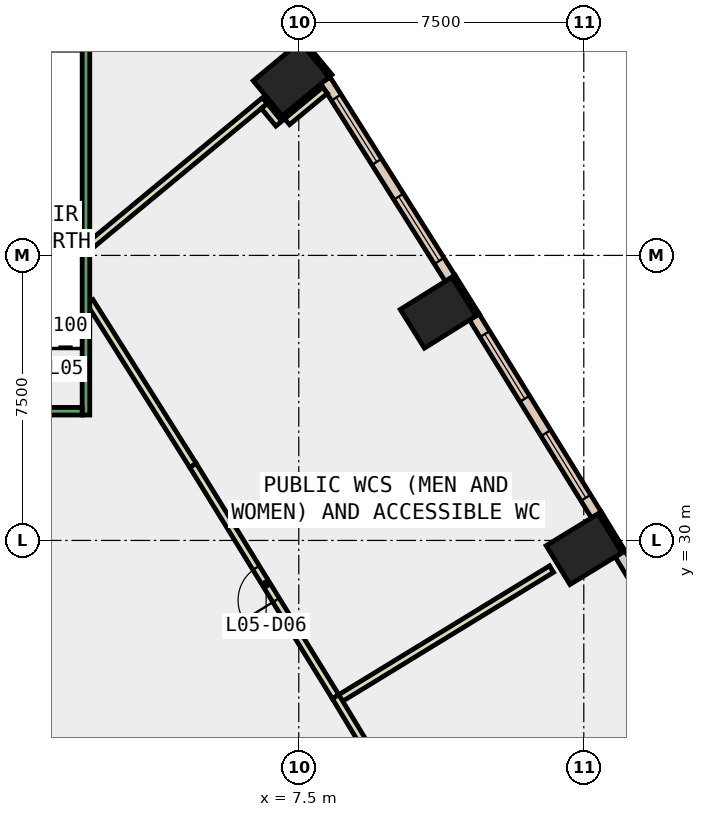
"""IFC4 building model, lengths in metres.
Left out: names, types, materials, properties, quantities, classifications, styles, units other than length and angle.
Written with IfcOpenShell. Run it as: python <this file> out.ifc"""

import sys

from ifc_helpers import new_model, si_unit, direction, frame, frame_2d, origin, origin_2d, place, context, subcontext, project, spatial, rectangle, extrude, element, fill, save


model = new_model("IFC4")
c1 = context("Model", 3, precision=1e-05, world=origin(), true_north=direction((0.0, 1.0)))
c2 = subcontext(c1, "Body", "Model", "MODEL_VIEW")
j1 = project(units=[si_unit("LENGTHUNIT", "METRE"), si_unit("PLANEANGLEUNIT", "RADIAN")], contexts=[c1])
p1 = place(None, origin())
s1 = spatial("IfcSite", under=j1, at=p1, CompositionType="ELEMENT")
p2 = place(p1, origin())
s2 = spatial("IfcBuilding", under=s1, at=p2, CompositionType="ELEMENT")
p3 = place(p2, frame((0.0, 0.0, 30.0)))
s3 = spatial("IfcBuildingStorey", under=s2, at=p3, CompositionType="ELEMENT", Elevation=30.0)
for number, where, z_axis, x_axis in (
    (1, (15.005, 29.769, -0.45), (0.0, 0.0, 1.0), (-0.522, 0.853, 0.0)),
    (2, (11.167, 35.993, -0.45), (0.0, 0.0, 1.0), (-0.53, 0.848, 0.0)),
    (3, (7.299, 42.144, -0.45), (0.0, 0.0, 1.0), (-0.638, 0.77, 0.0)),
):
    element("IfcColumn", number, at=place(p3, frame(where, z_axis=z_axis, x_axis=x_axis)), inside=s3, PredefinedType="COLUMN", context=c2, shape_type="SweptSolid", body=[
        extrude(rectangle(XDim=1.2, YDim=1.6, at=origin_2d()), origin(), (0.0, 0.0, 1.0), 4.85),
    ])
p4 = place(p3, frame((16.043, 29.7, 0.0), z_axis=(0.0, 0.0, 1.0), x_axis=(-0.521507599072, 0.853246637327, 0.0)))
e4 = element("IfcWall", 4, at=p4, inside=s3, PredefinedType="STANDARD", context=c2, shape_type="SweptSolid", body=[
    extrude(rectangle(XDim=1.2, YDim=0.1, at=frame_2d((0.6, 0.0))), origin(), (0.0, 0.0, 1.0), 4.4),
])
for number, where, z_axis, x_axis in (
    (5, (12.206, 35.935, 0.0), (0.0, 0.0, 1.0), (-0.53, 0.848, 0.0)),
    (6, (8.336, 42.224, 0.0), (0.0, 0.0, 1.0), (-0.638, 0.77, 0.0)),
):
    element("IfcWall", number, at=place(p3, frame(where, z_axis=z_axis, x_axis=x_axis)), inside=s3, PredefinedType="STANDARD", context=c2, shape_type="SweptSolid", body=[
        extrude(rectangle(XDim=1.199, YDim=0.1, at=frame_2d((0.6, 0.0))), origin(), (0.0, 0.0, 1.0), 4.4),
    ])
p5 = place(p3, frame((19.117, 24.406, 0.0), z_axis=(0.0, 0.0, 1.0), x_axis=(-0.516687651362, 0.85617397235, 0.0)))
e7 = element("IfcWall", 7, at=p5, inside=s3, PredefinedType="STANDARD", context=c2, shape_type="SweptSolid", body=[
    extrude(rectangle(XDim=6.121, YDim=0.3, at=frame_2d((3.061, 0.0))), origin(), (0.0, 0.0, 1.0), 4.4),
])
p6 = place(p5, frame((0.53, 0.0, 1.0)))
e8 = element("IfcOpeningElement", 8, at=p6, cuts=e7, PredefinedType="OPENING", context=c2, shape_type="SweptSolid", body=[
    extrude(rectangle(XDim=2.0, YDim=3.2, at=frame_2d((1.0, 1.6))), frame((0.0, 0.16, 0.0), z_axis=(0.0, -1.0, 0.0), x_axis=(1.0, 0.0, 0.0)), (0.0, 0.0, 1.0), 0.32),
])
p7 = place(p5, frame((3.591, 0.0, 1.0)))
e9 = element("IfcOpeningElement", 9, at=p7, cuts=e7, PredefinedType="OPENING", context=c2, shape_type="SweptSolid", body=[
    extrude(rectangle(XDim=2.0, YDim=3.2, at=frame_2d((1.0, 1.6))), frame((0.0, 0.16, 0.0), z_axis=(0.0, -1.0, 0.0), x_axis=(1.0, 0.0, 0.0)), (0.0, 0.0, 1.0), 0.32),
])
p8 = place(p3, frame((15.331, 30.67, 0.0), z_axis=(0.0, 0.0, 1.0), x_axis=(-0.524953701886, 0.85113078365, 0.0)))
e10 = element("IfcWall", 10, at=p8, inside=s3, PredefinedType="STANDARD", context=c2, shape_type="SweptSolid", body=[
    extrude(rectangle(XDim=6.123, YDim=0.3, at=frame_2d((3.061, 0.0))), origin(), (0.0, 0.0, 1.0), 4.4),
])
p9 = place(p8, frame((0.531, 0.0, 1.0)))
e11 = element("IfcOpeningElement", 11, at=p9, cuts=e10, PredefinedType="OPENING", context=c2, shape_type="SweptSolid", body=[
    extrude(rectangle(XDim=2.0, YDim=3.2, at=frame_2d((1.0, 1.6))), frame((0.0, 0.16, 0.0), z_axis=(0.0, -1.0, 0.0), x_axis=(1.0, 0.0, 0.0)), (0.0, 0.0, 1.0), 0.32),
])
p10 = place(p8, frame((3.592, 0.0, 1.0)))
e12 = element("IfcOpeningElement", 12, at=p10, cuts=e10, PredefinedType="OPENING", context=c2, shape_type="SweptSolid", body=[
    extrude(rectangle(XDim=2.0, YDim=3.2, at=frame_2d((1.0, 1.6))), frame((0.0, 0.16, 0.0), z_axis=(0.0, -1.0, 0.0), x_axis=(1.0, 0.0, 0.0)), (0.0, 0.0, 1.0), 0.32),
])
p11 = place(p3, frame((11.483, 36.897, 0.0), z_axis=(0.0, 0.0, 1.0), x_axis=(-0.53304020879, 0.846089910006, 0.0)))
e13 = element("IfcWall", 13, at=p11, inside=s3, PredefinedType="STANDARD", context=c2, shape_type="SweptSolid", body=[
    extrude(rectangle(XDim=6.163, YDim=0.3, at=frame_2d((3.081, 0.0))), origin(), (0.0, 0.0, 1.0), 4.4),
])
p12 = place(p11, frame((0.541, 0.0, 1.0)))
e14 = element("IfcOpeningElement", 14, at=p12, cuts=e13, PredefinedType="OPENING", context=c2, shape_type="SweptSolid", body=[
    extrude(rectangle(XDim=2.0, YDim=3.2, at=frame_2d((1.0, 1.6))), frame((0.0, 0.16, 0.0), z_axis=(0.0, -1.0, 0.0), x_axis=(1.0, 0.0, 0.0)), (0.0, 0.0, 1.0), 0.32),
])
p13 = place(p11, frame((3.622, 0.0, 1.0)))
e15 = element("IfcOpeningElement", 15, at=p13, cuts=e13, PredefinedType="OPENING", context=c2, shape_type="SweptSolid", body=[
    extrude(rectangle(XDim=2.0, YDim=3.2, at=frame_2d((1.0, 1.6))), frame((0.0, 0.16, 0.0), z_axis=(0.0, -1.0, 0.0), x_axis=(1.0, 0.0, 0.0)), (0.0, 0.0, 1.0), 0.32),
])
p14 = place(p3, frame((8.52, 25.804, 0.0), z_axis=(0.0, 0.0, 1.0), x_axis=(0.853194970622, 0.521592122358, 0.0)))
e16 = element("IfcWall", 16, at=p14, inside=s3, PredefinedType="PARTITIONING", context=c2, shape_type="SweptSolid", body=[
    extrude(rectangle(XDim=6.601, YDim=0.2, at=frame_2d((3.301, 0.0))), origin(), (0.0, 0.0, 1.0), 4.4),
])
p15 = place(p3, frame((12.256, 19.614, 0.0), z_axis=(0.0, 0.0, 1.0), x_axis=(-0.516756729015, 0.856132281261, 0.0)))
e17 = element("IfcWall", 17, at=p15, inside=s3, PredefinedType="PARTITIONING", context=c2, shape_type="SweptSolid", body=[
    extrude(rectangle(XDim=7.331, YDim=0.2, at=frame_2d((3.665, 0.0))), origin(), (0.0, 0.0, 1.0), 4.4),
])
p16 = place(p15, frame((0.1, 0.0, 0.0)))
e18 = element("IfcOpeningElement", 18, at=p16, cuts=e17, PredefinedType="OPENING", context=c2, shape_type="SweptSolid", body=[
    extrude(rectangle(XDim=1.0, YDim=2.1, at=frame_2d((0.5, 1.05))), frame((0.0, 0.11, 0.0), z_axis=(0.0, -1.0, 0.0), x_axis=(1.0, 0.0, 0.0)), (0.0, 0.0, 1.0), 0.22),
])
p17 = place(p3, frame((2.0, 37.758, 0.0), z_axis=(0.0, 0.0, 1.0), x_axis=(0.7702988792, 0.637683022122, 0.0)))
e19 = element("IfcWall", 19, at=p17, inside=s3, PredefinedType="PARTITIONING", context=c2, shape_type="SweptSolid", body=[
    extrude(rectangle(XDim=5.979, YDim=0.2, at=frame_2d((2.99, 0.0))), origin(), (0.0, 0.0, 1.0), 4.4),
])
p18 = place(p3, frame((6.593, 41.43, 0.0), z_axis=(0.0, 0.0, 1.0), x_axis=(0.636576557089, -0.771213515808, 0.0)))
e20 = element("IfcWall", 20, at=p18, inside=s3, PredefinedType="PARTITIONING", context=c2, shape_type="SweptSolid", body=[
    extrude(rectangle(XDim=0.6, YDim=0.2, at=frame_2d((0.3, 0.0))), origin(), (0.0, 0.0, 1.0), 4.4),
])
p19 = place(p3, frame((7.193, 41.018, 0.0), z_axis=(0.0, 0.0, 1.0), x_axis=(0.77046149962, 0.637486531311, 0.0)))
e21 = element("IfcWall", 21, at=p19, inside=s3, PredefinedType="PARTITIONING", context=c2, shape_type="SweptSolid", body=[
    extrude(rectangle(XDim=1.292, YDim=0.2, at=frame_2d((0.646, 0.0))), origin(), (0.0, 0.0, 1.0), 4.4),
])
p20 = place(p3, frame((4.717, 31.973, 0.0), z_axis=(0.0, 0.0, 1.0), x_axis=(-0.533277069601, 0.845940640375, 0.0)))
e22 = element("IfcWall", 22, at=p20, inside=s3, PredefinedType="PARTITIONING", context=c2, shape_type="SweptSolid", body=[
    extrude(rectangle(XDim=5.095, YDim=0.2, at=frame_2d((2.547, 0.0))), origin(), (0.0, 0.0, 1.0), 4.4),
])
p21 = place(p3, frame((8.467, 25.89, 0.0), z_axis=(0.0, 0.0, 1.0), x_axis=(-0.524768238136, 0.851245144623, 0.0)))
e23 = element("IfcWall", 23, at=p21, inside=s3, PredefinedType="PARTITIONING", context=c2, shape_type="SweptSolid", body=[
    extrude(rectangle(XDim=7.146, YDim=0.2, at=frame_2d((3.573, 0.0))), origin(), (0.0, 0.0, 1.0), 4.4),
])
p22 = place(p21, frame((2.981, 0.0, 0.0)))
e24 = element("IfcOpeningElement", 24, at=p22, cuts=e23, PredefinedType="OPENING", context=c2, shape_type="SweptSolid", body=[
    extrude(rectangle(XDim=1.0, YDim=2.1, at=frame_2d((0.5, 1.05))), frame((0.0, 0.11, 0.0), z_axis=(0.0, -1.0, 0.0), x_axis=(1.0, 0.0, 0.0)), (0.0, 0.0, 1.0), 0.22),
])
p23 = place(p3, frame((1.9, 33.3, 0.0), z_axis=(0.0, 0.0, 1.0), x_axis=(0.0, 1.0, 0.0)))
e25 = element("IfcWall", 25, at=p23, inside=s3, PredefinedType="STANDARD", context=c2, shape_type="SweptSolid", body=[
    extrude(rectangle(XDim=9.8, YDim=0.2, at=frame_2d((4.9, 0.0))), origin(), (0.0, 0.0, 1.0), 3.2),
])
p24 = place(p3, frame((1.8, 33.4, 0.0), z_axis=(0.0, 0.0, 1.0), x_axis=(-1.0, 0.0, 0.0)))
e26 = element("IfcWall", 26, at=p24, inside=s3, PredefinedType="STANDARD", context=c2, shape_type="SweptSolid", body=[
    extrude(rectangle(XDim=3.6, YDim=0.2, at=frame_2d((1.8, 0.0))), origin(), (0.0, 0.0, 1.0), 3.2),
])
p25 = place(p24, frame((1.2, 0.0, 0.0)))
e27 = element("IfcOpeningElement", 27, at=p25, cuts=e26, PredefinedType="OPENING", context=c2, shape_type="SweptSolid", body=[
    extrude(rectangle(XDim=1.2, YDim=2.2, at=frame_2d((0.6, 1.1))), frame((0.0, 0.11, 0.0), z_axis=(0.0, -1.0, 0.0), x_axis=(1.0, 0.0, 0.0)), (0.0, 0.0, 1.0), 0.22),
])
p26 = place(p9, origin())
e28 = element("IfcWindow", 28, at=p26, inside=s3, PartitioningType="SINGLE_PANEL", PredefinedType="WINDOW", context=c2, shape_type="SweptSolid", body=[
    extrude(rectangle(XDim=2.0, YDim=3.2, at=frame_2d((1.0, 1.6))), frame((0.0, 0.03, 0.0), z_axis=(0.0, -1.0, 0.0), x_axis=(1.0, 0.0, 0.0)), (0.0, 0.0, 1.0), 0.06),
])
fill(e11, e28)
p27 = place(p10, origin())
e29 = element("IfcWindow", 29, at=p27, inside=s3, PartitioningType="SINGLE_PANEL", PredefinedType="WINDOW", context=c2, shape_type="SweptSolid", body=[
    extrude(rectangle(XDim=2.0, YDim=3.2, at=frame_2d((1.0, 1.6))), frame((0.0, 0.03, 0.0), z_axis=(0.0, -1.0, 0.0), x_axis=(1.0, 0.0, 0.0)), (0.0, 0.0, 1.0), 0.06),
])
fill(e12, e29)
p28 = place(p12, origin())
e30 = element("IfcWindow", 30, at=p28, inside=s3, PartitioningType="SINGLE_PANEL", PredefinedType="WINDOW", context=c2, shape_type="SweptSolid", body=[
    extrude(rectangle(XDim=2.0, YDim=3.2, at=frame_2d((1.0, 1.6))), frame((0.0, 0.03, 0.0), z_axis=(0.0, -1.0, 0.0), x_axis=(1.0, 0.0, 0.0)), (0.0, 0.0, 1.0), 0.06),
])
fill(e14, e30)
p29 = place(p13, origin())
e31 = element("IfcWindow", 31, at=p29, inside=s3, PartitioningType="SINGLE_PANEL", PredefinedType="WINDOW", context=c2, shape_type="SweptSolid", body=[
    extrude(rectangle(XDim=2.0, YDim=3.2, at=frame_2d((1.0, 1.6))), frame((0.0, 0.03, 0.0), z_axis=(0.0, -1.0, 0.0), x_axis=(1.0, 0.0, 0.0)), (0.0, 0.0, 1.0), 0.06),
])
fill(e15, e31)
p30 = place(p22, origin())
e32 = element("IfcDoor", 32, at=p30, inside=s3, OperationType="SINGLE_SWING_LEFT", PredefinedType="DOOR", context=c2, shape_type="SweptSolid", body=[
    extrude(rectangle(XDim=1.0, YDim=2.1, at=frame_2d((0.5, 1.05))), frame((0.0, 0.025, 0.0), z_axis=(0.0, -1.0, 0.0), x_axis=(1.0, 0.0, 0.0)), (0.0, 0.0, 1.0), 0.05),
])
fill(e24, e32)
save(model, sys.argv[1])
